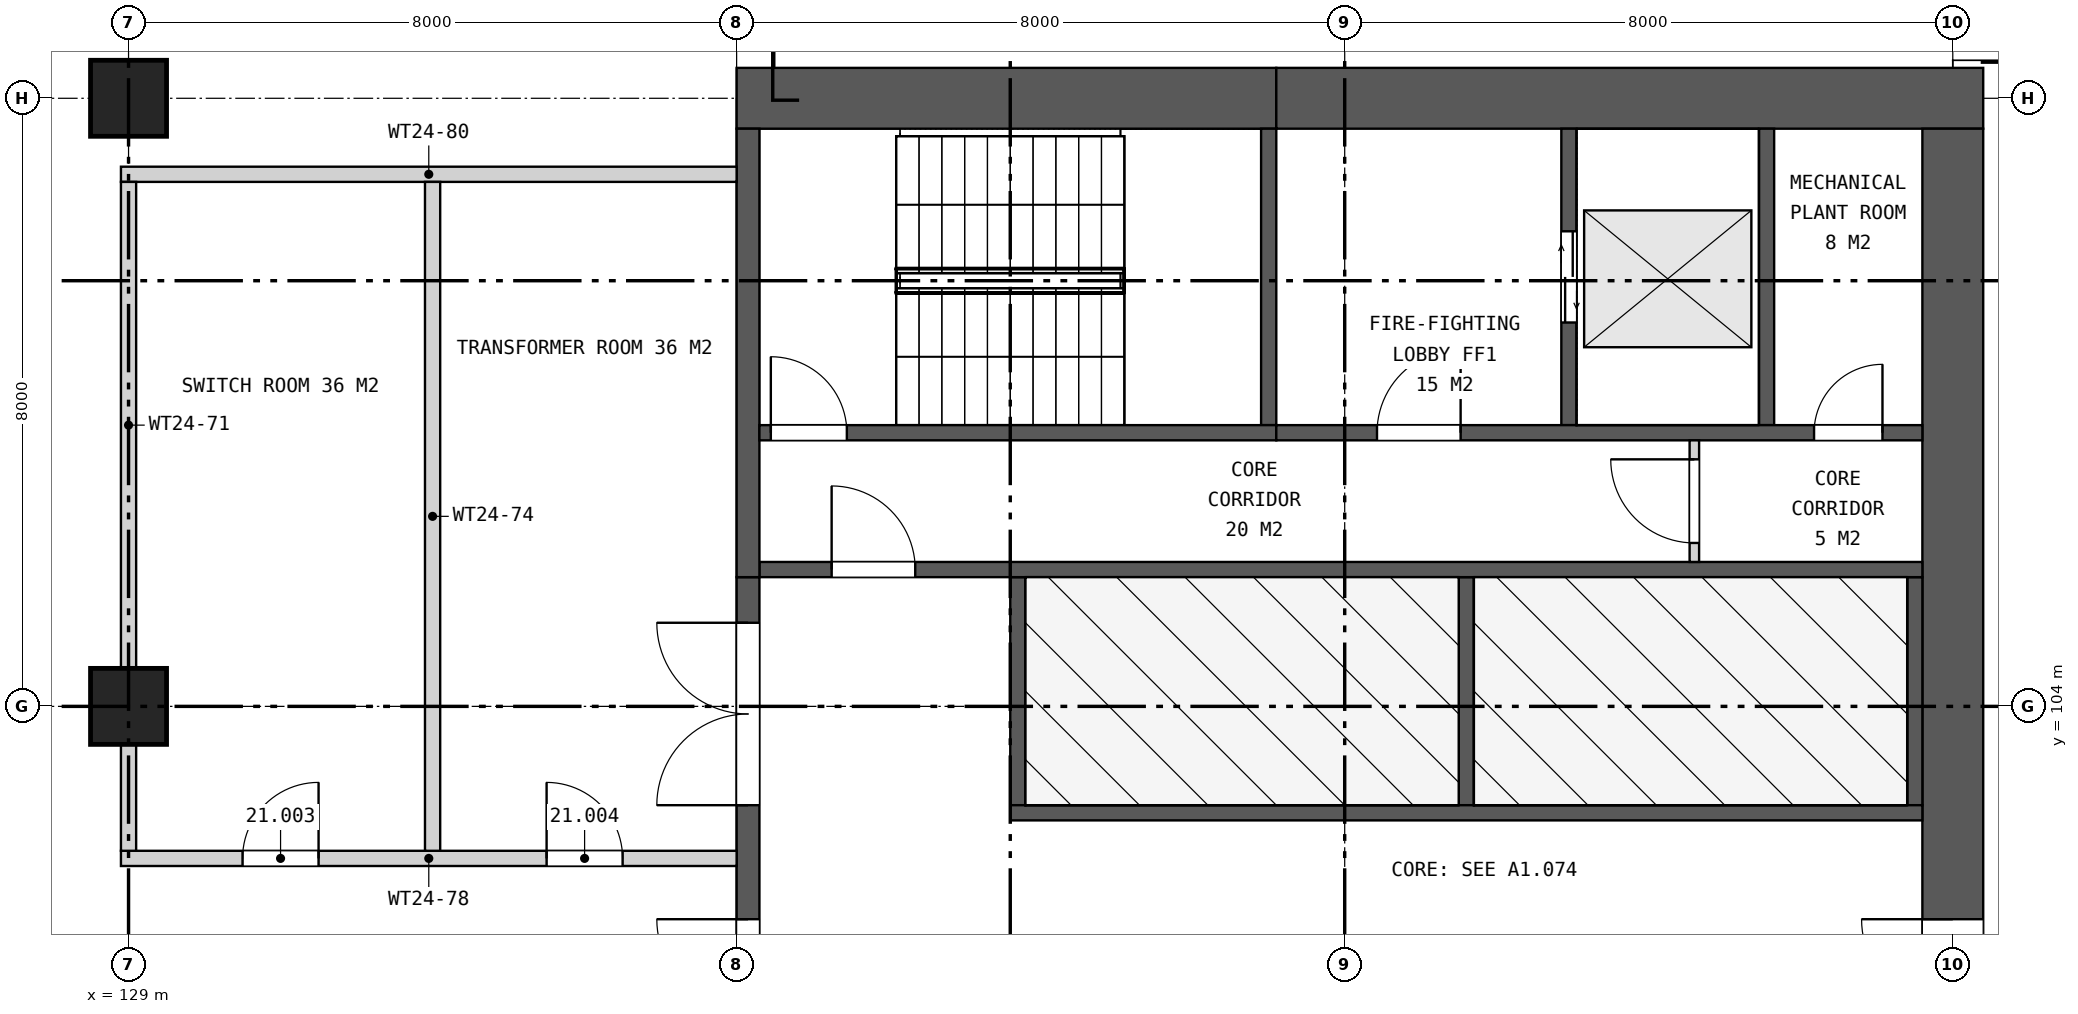
"""IFC4 building model, lengths in metres.
Left out: names, types, materials, properties, quantities, classifications, styles, units other than length and angle.
Written with IfcOpenShell. Run it as: python <this file> out.ifc"""

import sys

from ifc_helpers import new_model, si_unit, direction, frame, frame_2d, origin, origin_2d, place, context, subcontext, project, spatial, rectangle, extrude, element, fill, save


model = new_model("IFC4")
c1 = context("Model", 3, precision=1e-05, world=origin(), true_north=direction((0.0, 1.0)))
c2 = subcontext(c1, "Body", "Model", "MODEL_VIEW")
j1 = project(units=[si_unit("LENGTHUNIT", "METRE"), si_unit("PLANEANGLEUNIT", "RADIAN")], contexts=[c1])
p1 = place(None, origin())
s1 = spatial("IfcSite", under=j1, at=p1, CompositionType="ELEMENT")
p2 = place(p1, origin())
s2 = spatial("IfcBuilding", under=s1, at=p2, CompositionType="ELEMENT")
p3 = place(p2, frame((0.0, 0.0, 105.3)))
s3 = spatial("IfcBuildingStorey", under=s2, at=p3, CompositionType="ELEMENT", Elevation=105.3)
for number, where, z_axis, x_axis in (
    (1, (129.0, 104.0, 0.0), (0.0, 0.0, 1.0), (1.0, 0.0, 0.0)),
    (2, (129.0, 112.0, 0.0), (0.0, 0.0, 1.0), (1.0, 0.0, 0.0)),
):
    element("IfcColumn", number, at=place(p3, frame(where, z_axis=z_axis, x_axis=x_axis)), inside=s3, PredefinedType="COLUMN", context=c2, shape_type="SweptSolid", body=[
        extrude(rectangle(XDim=1.0, YDim=1.0, at=origin_2d()), origin(), (0.0, 0.0, 1.0), 7.4),
    ])
p4 = place(p3, frame((137.0, 112.0, 0.0), z_axis=(0.0, 0.0, 1.0), x_axis=(1.0, 0.0, 0.0)))
e3 = element("IfcWall", 3, at=p4, inside=s3, PredefinedType="SHEAR", context=c2, shape_type="SweptSolid", body=[
    extrude(rectangle(XDim=7.1, YDim=0.8, at=frame_2d((3.55, 0.0))), origin(), (0.0, 0.0, 1.0), 7.4),
])
p5 = place(p3, frame((144.1, 112.0, 0.0), z_axis=(0.0, 0.0, 1.0), x_axis=(1.0, 0.0, 0.0)))
e4 = element("IfcWall", 4, at=p5, inside=s3, PredefinedType="SHEAR", context=c2, shape_type="SweptSolid", body=[
    extrude(rectangle(XDim=9.3, YDim=0.8, at=frame_2d((4.65, 0.0))), origin(), (0.0, 0.0, 1.0), 7.4),
])
p6 = place(p3, frame((153.0, 88.4, 0.0), z_axis=(0.0, 0.0, 1.0), x_axis=(0.0, 1.0, 0.0)))
e5 = element("IfcWall", 5, at=p6, inside=s3, PredefinedType="SHEAR", context=c2, shape_type="SweptSolid", body=[
    extrude(rectangle(XDim=23.2, YDim=0.8, at=frame_2d((11.6, 0.0))), origin(), (0.0, 0.0, 1.0), 7.4),
])
p7 = place(p6, frame((10.4, 0.0, 0.0)))
e6 = element("IfcOpeningElement", 6, at=p7, cuts=e5, PredefinedType="OPENING", context=c2, shape_type="SweptSolid", body=[
    extrude(rectangle(XDim=2.4, YDim=2.4, at=frame_2d((1.2, 1.2))), frame((0.0, 0.41, 0.0), z_axis=(0.0, -1.0, 0.0), x_axis=(1.0, 0.0, 0.0)), (0.0, 0.0, 1.0), 0.82),
])
p8 = place(p3, frame((137.15, 94.3, 0.0), z_axis=(0.0, 0.0, 1.0), x_axis=(0.0, 1.0, 0.0)))
e7 = element("IfcWall", 7, at=p8, inside=s3, PredefinedType="SHEAR", context=c2, shape_type="SweptSolid", body=[
    extrude(rectangle(XDim=11.4, YDim=0.3, at=frame_2d((5.7, 0.0))), origin(), (0.0, 0.0, 1.0), 7.4),
])
p9 = place(p8, frame((0.6, 0.0, 0.0)))
e8 = element("IfcOpeningElement", 8, at=p9, cuts=e7, PredefinedType="OPENING", context=c2, shape_type="SweptSolid", body=[
    extrude(rectangle(XDim=2.4, YDim=2.4, at=frame_2d((1.2, 1.2))), frame((0.0, 0.16, 0.0), z_axis=(0.0, -1.0, 0.0), x_axis=(1.0, 0.0, 0.0)), (0.0, 0.0, 1.0), 0.32),
])
p10 = place(p8, frame((4.5, 0.0, 0.0)))
e9 = element("IfcOpeningElement", 9, at=p10, cuts=e7, PredefinedType="OPENING", context=c2, shape_type="SweptSolid", body=[
    extrude(rectangle(XDim=2.4, YDim=2.4, at=frame_2d((1.2, 1.2))), frame((0.0, 0.16, 0.0), z_axis=(0.0, -1.0, 0.0), x_axis=(1.0, 0.0, 0.0)), (0.0, 0.0, 1.0), 0.32),
])
p11 = place(p8, frame((8.4, 0.0, 0.0)))
e10 = element("IfcOpeningElement", 10, at=p11, cuts=e7, PredefinedType="OPENING", context=c2, shape_type="SweptSolid", body=[
    extrude(rectangle(XDim=2.4, YDim=2.4, at=frame_2d((1.2, 1.2))), frame((0.0, 0.16, 0.0), z_axis=(0.0, -1.0, 0.0), x_axis=(1.0, 0.0, 0.0)), (0.0, 0.0, 1.0), 0.32),
])
for number, where, z_axis, x_axis in (
    (11, (140.7, 102.7, 0.0), (0.0, 0.0, 1.0), (0.0, 1.0, 0.0)),
    (12, (146.6, 102.7, 0.0), (0.0, 0.0, 1.0), (0.0, 1.0, 0.0)),
    (13, (152.5, 102.7, 0.0), (0.0, 0.0, 1.0), (0.0, 1.0, 0.0)),
):
    element("IfcWall", number, at=place(p3, frame(where, z_axis=z_axis, x_axis=x_axis)), inside=s3, PredefinedType="SHEAR", context=c2, shape_type="SweptSolid", body=[
        extrude(rectangle(XDim=3.0, YDim=0.2, at=frame_2d((1.5, 0.0))), origin(), (0.0, 0.0, 1.0), 7.4),
    ])
p12 = place(p3, frame((140.6, 102.6, 0.0), z_axis=(0.0, 0.0, 1.0), x_axis=(1.0, 0.0, 0.0)))
e14 = element("IfcWall", 14, at=p12, inside=s3, PredefinedType="SHEAR", context=c2, shape_type="SweptSolid", body=[
    extrude(rectangle(XDim=12.0, YDim=0.2, at=frame_2d((6.0, 0.0))), origin(), (0.0, 0.0, 1.0), 7.4),
])
p13 = place(p3, frame((137.3, 105.8, 0.0), z_axis=(0.0, 0.0, 1.0), x_axis=(1.0, 0.0, 0.0)))
e15 = element("IfcWall", 15, at=p13, inside=s3, PredefinedType="SHEAR", context=c2, shape_type="SweptSolid", body=[
    extrude(rectangle(XDim=15.3, YDim=0.2, at=frame_2d((7.65, 0.0))), origin(), (0.0, 0.0, 1.0), 7.4),
])
p14 = place(p13, frame((0.95, 0.0, 0.0)))
e16 = element("IfcOpeningElement", 16, at=p14, cuts=e15, PredefinedType="OPENING", context=c2, shape_type="SweptSolid", body=[
    extrude(rectangle(XDim=1.1, YDim=2.1, at=frame_2d((0.55, 1.05))), frame((0.0, 0.11, 0.0), z_axis=(0.0, -1.0, 0.0), x_axis=(1.0, 0.0, 0.0)), (0.0, 0.0, 1.0), 0.22),
])
p15 = place(p3, frame((137.15, 105.7, 0.0), z_axis=(0.0, 0.0, 1.0), x_axis=(0.0, 1.0, 0.0)))
e17 = element("IfcWall", 17, at=p15, inside=s3, PredefinedType="SHEAR", context=c2, shape_type="SweptSolid", body=[
    extrude(rectangle(XDim=5.9, YDim=0.3, at=frame_2d((2.95, 0.0))), origin(), (0.0, 0.0, 1.0), 7.4),
])
p16 = place(p3, frame((144.0, 107.7, 0.0), z_axis=(0.0, 0.0, 1.0), x_axis=(0.0, 1.0, 0.0)))
e18 = element("IfcWall", 18, at=p16, inside=s3, PredefinedType="SHEAR", context=c2, shape_type="SweptSolid", body=[
    extrude(rectangle(XDim=3.9, YDim=0.2, at=frame_2d((1.95, 0.0))), origin(), (0.0, 0.0, 1.0), 7.4),
])
p17 = place(p3, frame((147.95, 107.7, 0.0), z_axis=(0.0, 0.0, 1.0), x_axis=(0.0, 1.0, 0.0)))
e19 = element("IfcWall", 19, at=p17, inside=s3, PredefinedType="SHEAR", context=c2, shape_type="SweptSolid", body=[
    extrude(rectangle(XDim=3.9, YDim=0.2, at=frame_2d((1.95, 0.0))), origin(), (0.0, 0.0, 1.0), 7.4),
])
p18 = place(p17, frame((1.35, 0.0, 0.0)))
e20 = element("IfcOpeningElement", 20, at=p18, cuts=e19, PredefinedType="OPENING", context=c2, shape_type="SweptSolid", body=[
    extrude(rectangle(XDim=1.2, YDim=2.1, at=frame_2d((0.6, 1.05))), frame((0.0, 0.11, 0.0), z_axis=(0.0, -1.0, 0.0), x_axis=(1.0, 0.0, 0.0)), (0.0, 0.0, 1.0), 0.22),
])
p19 = place(p3, frame((150.55, 107.7, 0.0), z_axis=(0.0, 0.0, 1.0), x_axis=(0.0, 1.0, 0.0)))
e21 = element("IfcWall", 21, at=p19, inside=s3, PredefinedType="SHEAR", context=c2, shape_type="SweptSolid", body=[
    extrude(rectangle(XDim=3.9, YDim=0.2, at=frame_2d((1.95, 0.0))), origin(), (0.0, 0.0, 1.0), 7.4),
])
p20 = place(p3, frame((137.3, 107.6, 0.0), z_axis=(0.0, 0.0, 1.0), x_axis=(1.0, 0.0, 0.0)))
e22 = element("IfcWall", 22, at=p20, inside=s3, PredefinedType="SHEAR", context=c2, shape_type="SweptSolid", body=[
    extrude(rectangle(XDim=6.8, YDim=0.2, at=frame_2d((3.4, 0.0))), origin(), (0.0, 0.0, 1.0), 7.4),
])
p21 = place(p20, frame((0.15, 0.0, 0.0)))
e23 = element("IfcOpeningElement", 23, at=p21, cuts=e22, PredefinedType="OPENING", context=c2, shape_type="SweptSolid", body=[
    extrude(rectangle(XDim=1.0, YDim=2.1, at=frame_2d((0.5, 1.05))), frame((0.0, 0.11, 0.0), z_axis=(0.0, -1.0, 0.0), x_axis=(1.0, 0.0, 0.0)), (0.0, 0.0, 1.0), 0.22),
])
p22 = place(p3, frame((144.1, 107.6, 0.0), z_axis=(0.0, 0.0, 1.0), x_axis=(1.0, 0.0, 0.0)))
e24 = element("IfcWall", 24, at=p22, inside=s3, PredefinedType="SHEAR", context=c2, shape_type="SweptSolid", body=[
    extrude(rectangle(XDim=8.5, YDim=0.2, at=frame_2d((4.25, 0.0))), origin(), (0.0, 0.0, 1.0), 7.4),
])
p23 = place(p22, frame((1.325, 0.0, 0.0)))
e25 = element("IfcOpeningElement", 25, at=p23, cuts=e24, PredefinedType="OPENING", context=c2, shape_type="SweptSolid", body=[
    extrude(rectangle(XDim=1.1, YDim=2.1, at=frame_2d((0.55, 1.05))), frame((0.0, 0.11, 0.0), z_axis=(0.0, -1.0, 0.0), x_axis=(1.0, 0.0, 0.0)), (0.0, 0.0, 1.0), 0.22),
])
p24 = place(p22, frame((7.075, 0.0, 0.0)))
e26 = element("IfcOpeningElement", 26, at=p24, cuts=e24, PredefinedType="OPENING", context=c2, shape_type="SweptSolid", body=[
    extrude(rectangle(XDim=0.9, YDim=2.1, at=frame_2d((0.45, 1.05))), frame((0.0, 0.11, 0.0), z_axis=(0.0, -1.0, 0.0), x_axis=(1.0, 0.0, 0.0)), (0.0, 0.0, 1.0), 0.22),
])
p25 = place(p3, frame((149.6, 105.9, 0.0), z_axis=(0.0, 0.0, 1.0), x_axis=(0.0, 1.0, 0.0)))
e27 = element("IfcWall", 27, at=p25, inside=s3, PredefinedType="PARTITIONING", context=c2, shape_type="SweptSolid", body=[
    extrude(rectangle(XDim=1.6, YDim=0.125, at=frame_2d((0.8, 0.0))), origin(), (0.0, 0.0, 1.0), 7.4),
])
p26 = place(p25, frame((0.25, 0.0, 0.0)))
e28 = element("IfcOpeningElement", 28, at=p26, cuts=e27, PredefinedType="OPENING", context=c2, shape_type="SweptSolid", body=[
    extrude(rectangle(XDim=1.1, YDim=2.1, at=frame_2d((0.55, 1.05))), frame((0.0, 0.073, 0.0), z_axis=(0.0, -1.0, 0.0), x_axis=(1.0, 0.0, 0.0)), (0.0, 0.0, 1.0), 0.145),
])
p27 = place(p3, frame((128.9, 102.0, 0.0), z_axis=(0.0, 0.0, 1.0), x_axis=(1.0, 0.0, 0.0)))
e29 = element("IfcWall", 29, at=p27, inside=s3, PredefinedType="SOLIDWALL", context=c2, shape_type="SweptSolid", body=[
    extrude(rectangle(XDim=8.1, YDim=0.2, at=frame_2d((4.05, 0.0))), origin(), (0.0, 0.0, 1.0), 6.64),
])
p28 = place(p27, frame((1.6, 0.0, 0.0)))
e30 = element("IfcOpeningElement", 30, at=p28, cuts=e29, PredefinedType="OPENING", context=c2, shape_type="SweptSolid", body=[
    extrude(rectangle(XDim=1.0, YDim=2.2, at=frame_2d((0.5, 1.1))), frame((0.0, 0.11, 0.0), z_axis=(0.0, -1.0, 0.0), x_axis=(1.0, 0.0, 0.0)), (0.0, 0.0, 1.0), 0.22),
])
p29 = place(p27, frame((5.6, 0.0, 0.0)))
e31 = element("IfcOpeningElement", 31, at=p29, cuts=e29, PredefinedType="OPENING", context=c2, shape_type="SweptSolid", body=[
    extrude(rectangle(XDim=1.0, YDim=2.2, at=frame_2d((0.5, 1.1))), frame((0.0, 0.11, 0.0), z_axis=(0.0, -1.0, 0.0), x_axis=(1.0, 0.0, 0.0)), (0.0, 0.0, 1.0), 0.22),
])
p30 = place(p3, frame((128.9, 111.0, 0.0), z_axis=(0.0, 0.0, 1.0), x_axis=(1.0, 0.0, 0.0)))
e32 = element("IfcWall", 32, at=p30, inside=s3, PredefinedType="SOLIDWALL", context=c2, shape_type="SweptSolid", body=[
    extrude(rectangle(XDim=8.1, YDim=0.2, at=frame_2d((4.05, 0.0))), origin(), (0.0, 0.0, 1.0), 6.64),
])
p31 = place(p3, frame((129.0, 102.1, 0.0), z_axis=(0.0, 0.0, 1.0), x_axis=(0.0, 1.0, 0.0)))
e33 = element("IfcWall", 33, at=p31, inside=s3, PredefinedType="SOLIDWALL", context=c2, shape_type="SweptSolid", body=[
    extrude(rectangle(XDim=1.4, YDim=0.2, at=frame_2d((0.7, 0.0))), origin(), (0.0, 0.0, 1.0), 6.64),
])
p32 = place(p3, frame((129.0, 104.5, 0.0), z_axis=(0.0, 0.0, 1.0), x_axis=(0.0, 1.0, 0.0)))
e34 = element("IfcWall", 34, at=p32, inside=s3, PredefinedType="SOLIDWALL", context=c2, shape_type="SweptSolid", body=[
    extrude(rectangle(XDim=6.4, YDim=0.2, at=frame_2d((3.2, 0.0))), origin(), (0.0, 0.0, 1.0), 6.64),
])
p33 = place(p3, frame((133.0, 102.1, 0.0), z_axis=(0.0, 0.0, 1.0), x_axis=(0.0, 1.0, 0.0)))
e35 = element("IfcWall", 35, at=p33, inside=s3, PredefinedType="SOLIDWALL", context=c2, shape_type="SweptSolid", body=[
    extrude(rectangle(XDim=8.8, YDim=0.2, at=frame_2d((4.4, 0.0))), origin(), (0.0, 0.0, 1.0), 6.636),
])
p34 = place(p7, origin())
e36 = element("IfcDoor", 36, at=p34, inside=s3, OperationType="DOUBLE_DOOR_SINGLE_SWING", PredefinedType="DOOR", context=c2, shape_type="SweptSolid", body=[
    extrude(rectangle(XDim=2.4, YDim=2.4, at=frame_2d((1.2, 1.2))), frame((0.0, 0.025, 0.0), z_axis=(0.0, -1.0, 0.0), x_axis=(1.0, 0.0, 0.0)), (0.0, 0.0, 1.0), 0.05),
])
fill(e6, e36)
p35 = place(p10, origin())
e37 = element("IfcDoor", 37, at=p35, inside=s3, OperationType="DOUBLE_DOOR_SINGLE_SWING", PredefinedType="DOOR", context=c2, shape_type="SweptSolid", body=[
    extrude(rectangle(XDim=2.4, YDim=2.4, at=frame_2d((1.2, 1.2))), frame((0.0, 0.025, 0.0), z_axis=(0.0, -1.0, 0.0), x_axis=(1.0, 0.0, 0.0)), (0.0, 0.0, 1.0), 0.05),
])
fill(e9, e37)
p36 = place(p11, origin())
e38 = element("IfcDoor", 38, at=p36, inside=s3, OperationType="DOUBLE_DOOR_SINGLE_SWING", PredefinedType="DOOR", context=c2, shape_type="SweptSolid", body=[
    extrude(rectangle(XDim=2.4, YDim=2.4, at=frame_2d((1.2, 1.2))), frame((0.0, 0.025, 0.0), z_axis=(0.0, -1.0, 0.0), x_axis=(1.0, 0.0, 0.0)), (0.0, 0.0, 1.0), 0.05),
])
fill(e10, e38)
p37 = place(p14, origin())
e39 = element("IfcDoor", 39, at=p37, inside=s3, OperationType="SINGLE_SWING_LEFT", PredefinedType="DOOR", context=c2, shape_type="SweptSolid", body=[
    extrude(rectangle(XDim=1.1, YDim=2.1, at=frame_2d((0.55, 1.05))), frame((0.0, 0.025, 0.0), z_axis=(0.0, -1.0, 0.0), x_axis=(1.0, 0.0, 0.0)), (0.0, 0.0, 1.0), 0.05),
])
fill(e16, e39)
p38 = place(p18, origin())
e40 = element("IfcDoor", 40, at=p38, inside=s3, OperationType="DOUBLE_DOOR_SLIDING", PredefinedType="DOOR", context=c2, shape_type="SweptSolid", body=[
    extrude(rectangle(XDim=1.2, YDim=2.1, at=frame_2d((0.6, 1.05))), frame((0.0, 0.025, 0.0), z_axis=(0.0, -1.0, 0.0), x_axis=(1.0, 0.0, 0.0)), (0.0, 0.0, 1.0), 0.05),
])
fill(e20, e40)
p39 = place(p21, origin())
e41 = element("IfcDoor", 41, at=p39, inside=s3, OperationType="SINGLE_SWING_LEFT", PredefinedType="DOOR", context=c2, shape_type="SweptSolid", body=[
    extrude(rectangle(XDim=1.0, YDim=2.1, at=frame_2d((0.5, 1.05))), frame((0.0, 0.025, 0.0), z_axis=(0.0, -1.0, 0.0), x_axis=(1.0, 0.0, 0.0)), (0.0, 0.0, 1.0), 0.05),
])
fill(e23, e41)
p40 = place(p23, origin())
e42 = element("IfcDoor", 42, at=p40, inside=s3, OperationType="SINGLE_SWING_RIGHT", PredefinedType="DOOR", context=c2, shape_type="SweptSolid", body=[
    extrude(rectangle(XDim=1.1, YDim=2.1, at=frame_2d((0.55, 1.05))), frame((0.0, 0.025, 0.0), z_axis=(0.0, -1.0, 0.0), x_axis=(1.0, 0.0, 0.0)), (0.0, 0.0, 1.0), 0.05),
])
fill(e25, e42)
p41 = place(p24, origin())
e43 = element("IfcDoor", 43, at=p41, inside=s3, OperationType="SINGLE_SWING_RIGHT", PredefinedType="DOOR", context=c2, shape_type="SweptSolid", body=[
    extrude(rectangle(XDim=0.9, YDim=2.1, at=frame_2d((0.45, 1.05))), frame((0.0, 0.025, 0.0), z_axis=(0.0, -1.0, 0.0), x_axis=(1.0, 0.0, 0.0)), (0.0, 0.0, 1.0), 0.05),
])
fill(e26, e43)
p42 = place(p26, origin())
e44 = element("IfcDoor", 44, at=p42, inside=s3, OperationType="SINGLE_SWING_RIGHT", PredefinedType="DOOR", context=c2, shape_type="SweptSolid", body=[
    extrude(rectangle(XDim=1.1, YDim=2.1, at=frame_2d((0.55, 1.05))), frame((0.0, 0.025, 0.0), z_axis=(0.0, -1.0, 0.0), x_axis=(1.0, 0.0, 0.0)), (0.0, 0.0, 1.0), 0.05),
])
fill(e28, e44)
p43 = place(p28, origin())
e45 = element("IfcDoor", 45, at=p43, inside=s3, OperationType="SINGLE_SWING_RIGHT", PredefinedType="DOOR", context=c2, shape_type="SweptSolid", body=[
    extrude(rectangle(XDim=1.0, YDim=2.2, at=frame_2d((0.5, 1.1))), frame((0.0, 0.025, 0.0), z_axis=(0.0, -1.0, 0.0), x_axis=(1.0, 0.0, 0.0)), (0.0, 0.0, 1.0), 0.05),
])
fill(e30, e45)
p44 = place(p29, origin())
e46 = element("IfcDoor", 46, at=p44, inside=s3, OperationType="SINGLE_SWING_LEFT", PredefinedType="DOOR", context=c2, shape_type="SweptSolid", body=[
    extrude(rectangle(XDim=1.0, YDim=2.2, at=frame_2d((0.5, 1.1))), frame((0.0, 0.025, 0.0), z_axis=(0.0, -1.0, 0.0), x_axis=(1.0, 0.0, 0.0)), (0.0, 0.0, 1.0), 0.05),
])
fill(e31, e46)
save(model, sys.argv[1])
